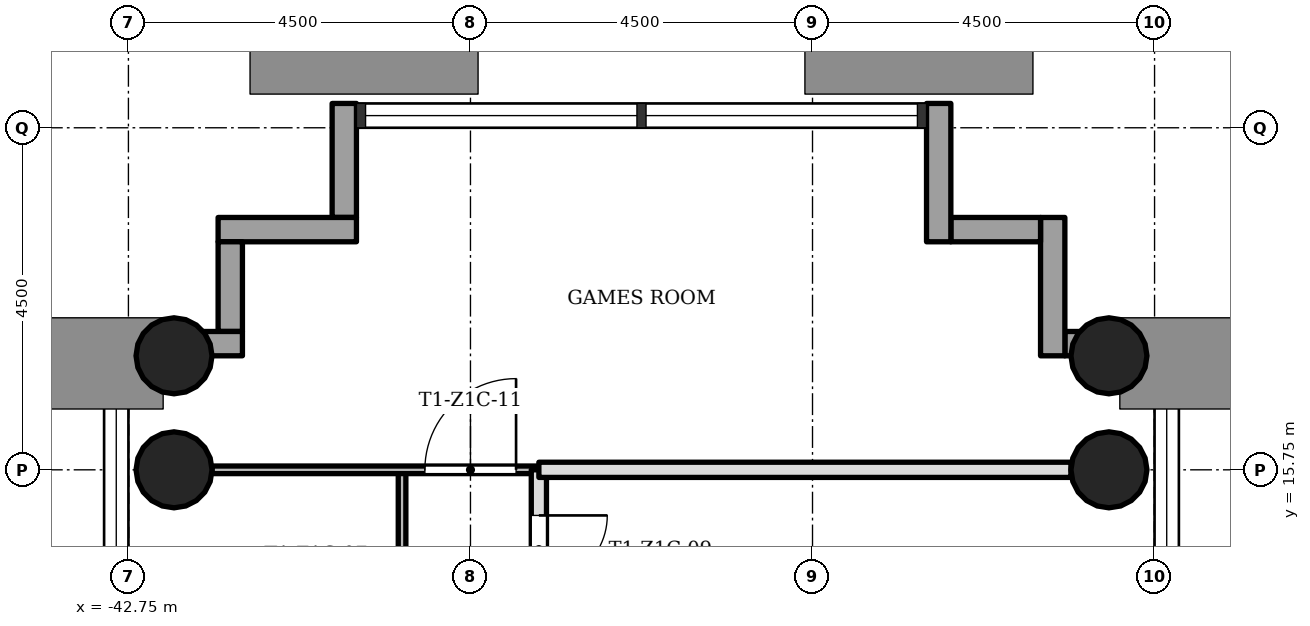
"""IFC4 building model, lengths in metres.
Left out: names, types, materials, properties, quantities, classifications, styles, units other than length and angle.
Written with IfcOpenShell. Run it as: python <this file> out.ifc"""

import sys

from ifc_helpers import new_model, si_unit, direction, frame, frame_2d, origin, origin_2d, place, context, subcontext, project, spatial, rectangle, hollow_circle, extrude, element, fill, save


model = new_model("IFC4")
c1 = context("Model", 3, precision=1e-05, world=origin(), true_north=direction((0.0, 1.0)))
c2 = subcontext(c1, "Body", "Model", "MODEL_VIEW")
j1 = project(units=[si_unit("LENGTHUNIT", "METRE"), si_unit("PLANEANGLEUNIT", "RADIAN")], contexts=[c1])
p1 = place(None, origin())
s1 = spatial("IfcSite", under=j1, at=p1, CompositionType="ELEMENT")
p2 = place(p1, origin())
s2 = spatial("IfcBuilding", under=s1, at=p2, CompositionType="ELEMENT")
p3 = place(p2, frame((0.0, 0.0, 44.9)))
s3 = spatial("IfcBuildingStorey", under=s2, at=p3, CompositionType="ELEMENT", Elevation=44.9)
for number, where, z_axis, x_axis in (
    (1, (-29.85, 15.75, 0.0), (0.0, 0.0, 1.0), (1.0, 0.0, 0.0)),
    (2, (-42.15, 15.75, 0.0), (0.0, 0.0, 1.0), (1.0, 0.0, 0.0)),
    (3, (-29.85, 17.25, 0.0), (0.0, 0.0, 1.0), (1.0, 0.0, 0.0)),
    (4, (-42.15, 17.25, 0.0), (0.0, 0.0, 1.0), (1.0, 0.0, 0.0)),
):
    element("IfcColumn", number, at=place(p3, frame(where, z_axis=z_axis, x_axis=x_axis)), inside=s3, PredefinedType="COLUMN", context=c2, shape_type="SweptSolid", body=[
        extrude(hollow_circle(Radius=0.5, WallThickness=0.036, at=origin_2d()), origin(), (0.0, 0.0, 1.0), 3.4),
    ])
p4 = place(p3, frame((-28.93, 17.41, -0.3), z_axis=(0.0, 0.0, 1.0), x_axis=(-1.0, 0.0, 0.0)))
e5 = element("IfcWall", 5, at=p4, inside=s3, PredefinedType="STANDARD", context=c2, shape_type="SweptSolid", body=[
    extrude(rectangle(XDim=1.5, YDim=0.32, at=frame_2d((0.75, 0.0))), origin(), (0.0, 0.0, 1.0), 3.4),
])
p5 = place(p3, frame((-30.59, 17.25, -0.3), z_axis=(0.0, 0.0, 1.0), x_axis=(0.0, 1.0, 0.0)))
e6 = element("IfcWall", 6, at=p5, inside=s3, PredefinedType="STANDARD", context=c2, shape_type="SweptSolid", body=[
    extrude(rectangle(XDim=1.82, YDim=0.32, at=frame_2d((0.91, 0.0))), origin(), (0.0, 0.0, 1.0), 3.4),
])
p6 = place(p3, frame((-30.75, 18.91, -0.3), z_axis=(0.0, 0.0, 1.0), x_axis=(-1.0, 0.0, 0.0)))
e7 = element("IfcWall", 7, at=p6, inside=s3, PredefinedType="STANDARD", context=c2, shape_type="SweptSolid", body=[
    extrude(rectangle(XDim=1.18, YDim=0.32, at=frame_2d((0.59, 0.0))), origin(), (0.0, 0.0, 1.0), 3.4),
])
p7 = place(p3, frame((-32.09, 18.75, -0.3), z_axis=(0.0, 0.0, 1.0), x_axis=(0.0, 1.0, 0.0)))
e8 = element("IfcWall", 8, at=p7, inside=s3, PredefinedType="STANDARD", context=c2, shape_type="SweptSolid", body=[
    extrude(rectangle(XDim=1.82, YDim=0.32, at=frame_2d((0.91, 0.0))), origin(), (0.0, 0.0, 1.0), 3.4),
])
p8 = place(p3, frame((-39.91, 20.57, -0.3), z_axis=(0.0, 0.0, 1.0), x_axis=(0.0, -1.0, 0.0)))
e9 = element("IfcWall", 9, at=p8, inside=s3, PredefinedType="STANDARD", context=c2, shape_type="SweptSolid", body=[
    extrude(rectangle(XDim=1.5, YDim=0.32, at=frame_2d((0.75, 0.0))), origin(), (0.0, 0.0, 1.0), 3.4),
])
p9 = place(p3, frame((-39.75, 18.91, -0.3), z_axis=(0.0, 0.0, 1.0), x_axis=(-1.0, 0.0, 0.0)))
e10 = element("IfcWall", 10, at=p9, inside=s3, PredefinedType="STANDARD", context=c2, shape_type="SweptSolid", body=[
    extrude(rectangle(XDim=1.82, YDim=0.32, at=frame_2d((0.91, 0.0))), origin(), (0.0, 0.0, 1.0), 3.4),
])
p10 = place(p3, frame((-41.41, 18.75, -0.3), z_axis=(0.0, 0.0, 1.0), x_axis=(0.0, -1.0, 0.0)))
e11 = element("IfcWall", 11, at=p10, inside=s3, PredefinedType="STANDARD", context=c2, shape_type="SweptSolid", body=[
    extrude(rectangle(XDim=1.18, YDim=0.32, at=frame_2d((0.59, 0.0))), origin(), (0.0, 0.0, 1.0), 3.4),
])
p11 = place(p3, frame((-41.25, 17.41, -0.3), z_axis=(0.0, 0.0, 1.0), x_axis=(-1.0, 0.0, 0.0)))
e12 = element("IfcWall", 12, at=p11, inside=s3, PredefinedType="STANDARD", context=c2, shape_type="SweptSolid", body=[
    extrude(rectangle(XDim=1.82, YDim=0.32, at=frame_2d((0.91, 0.0))), origin(), (0.0, 0.0, 1.0), 3.4),
])
p12 = place(p3, frame((-39.15, 6.75, 0.0), z_axis=(0.0, 0.0, 1.0), x_axis=(0.0, 1.0, 0.0)))
e13 = element("IfcWall", 13, at=p12, inside=s3, PredefinedType="PARTITIONING", context=c2, shape_type="SweptSolid", body=[
    extrude(rectangle(XDim=9.0, YDim=0.1, at=frame_2d((4.5, 0.0))), origin(), (0.0, 0.0, 1.0), 3.0),
])
p13 = place(p12, frame((1.8, 0.0, 0.0)))
e14 = element("IfcOpeningElement", 14, at=p13, cuts=e13, PredefinedType="OPENING", context=c2, shape_type="SweptSolid", body=[
    extrude(rectangle(XDim=0.9, YDim=2.1, at=frame_2d((0.45, 1.05))), frame((0.0, 0.06, 0.0), z_axis=(0.0, -1.0, 0.0), x_axis=(1.0, 0.0, 0.0)), (0.0, 0.0, 1.0), 0.12),
])
p14 = place(p12, frame((6.3, 0.0, 0.0)))
e15 = element("IfcOpeningElement", 15, at=p14, cuts=e13, PredefinedType="OPENING", context=c2, shape_type="SweptSolid", body=[
    extrude(rectangle(XDim=0.9, YDim=2.1, at=frame_2d((0.45, 1.05))), frame((0.0, 0.06, 0.0), z_axis=(0.0, -1.0, 0.0), x_axis=(1.0, 0.0, 0.0)), (0.0, 0.0, 1.0), 0.12),
])
p15 = place(p3, frame((-37.35, 11.25, 0.0), z_axis=(0.0, 0.0, 1.0), x_axis=(0.0, 1.0, 0.0)))
e16 = element("IfcWall", 16, at=p15, inside=s3, PredefinedType="SOLIDWALL", context=c2, shape_type="SweptSolid", body=[
    extrude(rectangle(XDim=4.5, YDim=0.2, at=frame_2d((2.25, 0.0))), origin(), (0.0, 0.0, 1.0), 3.0),
])
p16 = place(p15, frame((3.0, 0.0, 0.0)))
e17 = element("IfcOpeningElement", 17, at=p16, cuts=e16, PredefinedType="OPENING", context=c2, shape_type="SweptSolid", body=[
    extrude(rectangle(XDim=0.9, YDim=2.1, at=frame_2d((0.45, 1.05))), frame((0.0, 0.11, 0.0), z_axis=(0.0, -1.0, 0.0), x_axis=(1.0, 0.0, 0.0)), (0.0, 0.0, 1.0), 0.22),
])
p17 = place(p3, frame((-41.65, 15.75, 0.0), z_axis=(0.0, 0.0, 1.0), x_axis=(1.0, 0.0, 0.0)))
e18 = element("IfcWall", 18, at=p17, inside=s3, PredefinedType="PARTITIONING", context=c2, shape_type="SweptSolid", body=[
    extrude(rectangle(XDim=4.3, YDim=0.1, at=frame_2d((2.15, 0.0))), origin(), (0.0, 0.0, 1.0), 3.0),
])
p18 = place(p17, frame((2.8, 0.0, 0.0)))
e19 = element("IfcOpeningElement", 19, at=p18, cuts=e18, PredefinedType="OPENING", context=c2, shape_type="SweptSolid", body=[
    extrude(rectangle(XDim=1.2, YDim=2.1, at=frame_2d((0.6, 1.05))), frame((0.0, 0.06, 0.0), z_axis=(0.0, -1.0, 0.0), x_axis=(1.0, 0.0, 0.0)), (0.0, 0.0, 1.0), 0.12),
])
p19 = place(p3, frame((-37.35, 15.75, 0.0), z_axis=(0.0, 0.0, 1.0), x_axis=(1.0, 0.0, 0.0)))
e20 = element("IfcWall", 20, at=p19, inside=s3, PredefinedType="SOLIDWALL", context=c2, shape_type="SweptSolid", body=[
    extrude(rectangle(XDim=7.0, YDim=0.2, at=frame_2d((3.5, 0.0))), origin(), (0.0, 0.0, 1.0), 3.0),
])
p20 = place(p16, origin())
e21 = element("IfcDoor", 21, at=p20, inside=s3, OperationType="SINGLE_SWING_RIGHT", PredefinedType="DOOR", context=c2, shape_type="SweptSolid", body=[
    extrude(rectangle(XDim=0.9, YDim=2.1, at=frame_2d((0.45, 1.05))), frame((0.0, 0.025, 0.0), z_axis=(0.0, -1.0, 0.0), x_axis=(1.0, 0.0, 0.0)), (0.0, 0.0, 1.0), 0.05),
])
fill(e17, e21)
p21 = place(p18, origin())
e22 = element("IfcDoor", 22, at=p21, inside=s3, OperationType="SINGLE_SWING_LEFT", PredefinedType="DOOR", context=c2, shape_type="SweptSolid", body=[
    extrude(rectangle(XDim=1.2, YDim=2.1, at=frame_2d((0.6, 1.05))), frame((0.0, 0.025, 0.0), z_axis=(0.0, -1.0, 0.0), x_axis=(1.0, 0.0, 0.0)), (0.0, 0.0, 1.0), 0.05),
])
fill(e19, e22)
save(model, sys.argv[1])
